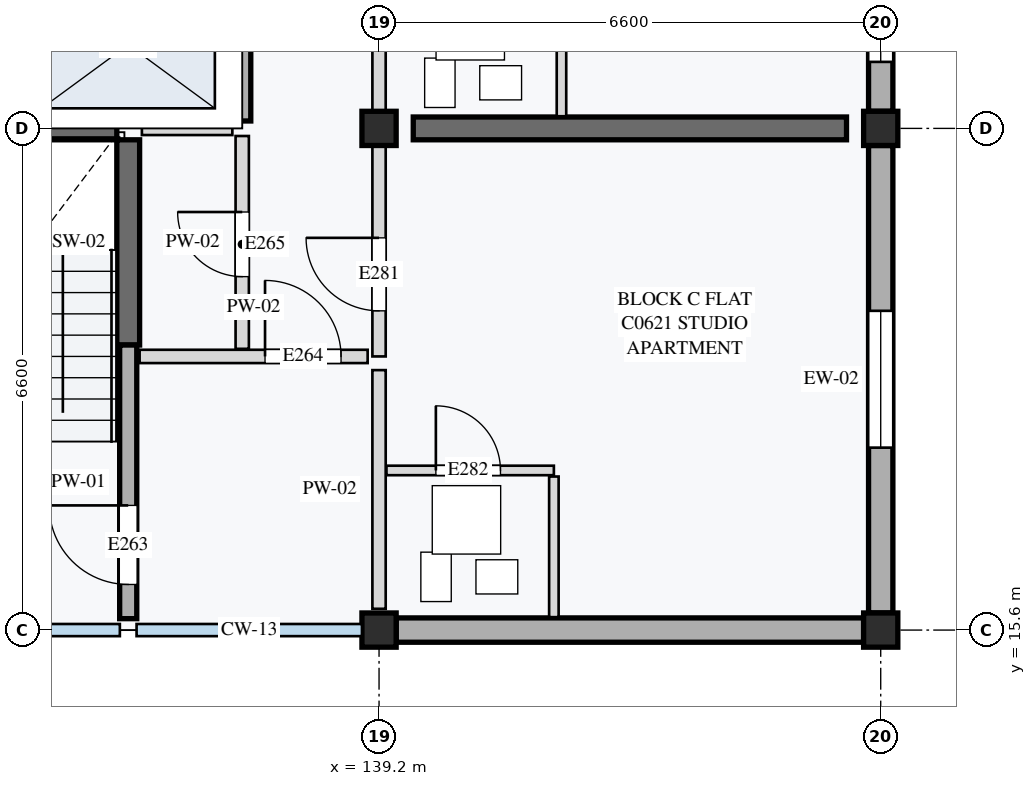
"""IFC4 building model, lengths in metres.
Left out: names, types, materials, properties, quantities, classifications, styles, units other than length and angle.
Written with IfcOpenShell. Run it as: python <this file> out.ifc"""

import sys

from ifc_helpers import new_model, si_unit, direction, frame, frame_2d, origin, origin_2d, place, context, subcontext, project, spatial, rectangle, extrude, element, fill, save


model = new_model("IFC4")
c1 = context("Model", 3, precision=1e-05, world=origin(), true_north=direction((0.0, 1.0)))
c2 = subcontext(c1, "Body", "Model", "MODEL_VIEW")
j1 = project(units=[si_unit("LENGTHUNIT", "METRE"), si_unit("PLANEANGLEUNIT", "RADIAN")], contexts=[c1])
p1 = place(None, origin())
s1 = spatial("IfcSite", under=j1, at=p1, CompositionType="ELEMENT")
p2 = place(p1, origin())
s2 = spatial("IfcBuilding", under=s1, at=p2, CompositionType="ELEMENT")
p3 = place(p2, frame((0.0, 0.0, 21.2)))
s3 = spatial("IfcBuildingStorey", under=s2, at=p3, CompositionType="ELEMENT", Elevation=21.2)
for number, where, z_axis, x_axis in (
    (1, (139.2, 15.6, 0.0), (0.0, 0.0, 1.0), (1.0, 0.0, 0.0)),
    (2, (145.8, 15.6, 0.0), (0.0, 0.0, 1.0), (1.0, 0.0, 0.0)),
    (3, (139.2, 22.2, 0.0), (0.0, 0.0, 1.0), (1.0, 0.0, 0.0)),
    (4, (145.8, 22.2, 0.0), (0.0, 0.0, 1.0), (1.0, 0.0, 0.0)),
):
    element("IfcColumn", number, at=place(p3, frame(where, z_axis=z_axis, x_axis=x_axis)), inside=s3, PredefinedType="COLUMN", context=c2, shape_type="SweptSolid", body=[
        extrude(rectangle(XDim=0.45, YDim=0.45, at=origin_2d()), origin(), (0.0, 0.0, 1.0), 3.2),
    ])
p4 = place(p3, frame((135.9, 19.35, 0.0), z_axis=(0.0, 0.0, 1.0), x_axis=(0.0, 1.0, 0.0)))
e5 = element("IfcWall", 5, at=p4, inside=s3, PredefinedType="SHEAR", context=c2, shape_type="SweptSolid", body=[
    extrude(rectangle(XDim=2.7, YDim=0.3, at=frame_2d((1.35, 0.0))), origin(), (0.0, 0.0, 1.0), 2.96),
])
p5 = place(p3, frame((132.95, 22.2, 0.0), z_axis=(0.0, 0.0, 1.0), x_axis=(1.0, 0.0, 0.0)))
e6 = element("IfcWall", 6, at=p5, inside=s3, PredefinedType="SHEAR", context=c2, shape_type="SweptSolid", body=[
    extrude(rectangle(XDim=2.8, YDim=0.3, at=frame_2d((1.4, 0.0))), origin(), (0.0, 0.0, 1.0), 2.96),
])
p6 = place(p3, frame((139.65, 22.2, 0.0), z_axis=(0.0, 0.0, 1.0), x_axis=(1.0, 0.0, 0.0)))
e7 = element("IfcWall", 7, at=p6, inside=s3, PredefinedType="SHEAR", context=c2, shape_type="SweptSolid", body=[
    extrude(rectangle(XDim=5.7, YDim=0.3, at=frame_2d((2.85, 0.0))), origin(), (0.0, 0.0, 1.0), 2.96),
])
p7 = place(p3, frame((145.8, 15.825, 0.0), z_axis=(0.0, 0.0, 1.0), x_axis=(0.0, 1.0, 0.0)))
e8 = element("IfcWall", 8, at=p7, inside=s3, PredefinedType="STANDARD", context=c2, shape_type="SweptSolid", body=[
    extrude(rectangle(XDim=6.15, YDim=0.32, at=frame_2d((3.075, 0.0))), origin(), (0.0, 0.0, 1.0), 2.6),
])
p8 = place(p7, frame((2.175, 0.0, 0.85)))
e9 = element("IfcOpeningElement", 9, at=p8, cuts=e8, PredefinedType="OPENING", context=c2, shape_type="SweptSolid", body=[
    extrude(rectangle(XDim=1.8, YDim=1.35, at=frame_2d((0.9, 0.675))), frame((0.0, 0.17, 0.0), z_axis=(0.0, -1.0, 0.0), x_axis=(1.0, 0.0, 0.0)), (0.0, 0.0, 1.0), 0.34),
])
p9 = place(p3, frame((145.8, 22.425, 0.0), z_axis=(0.0, 0.0, 1.0), x_axis=(0.0, 1.0, 0.0)))
e10 = element("IfcWall", 10, at=p9, inside=s3, PredefinedType="STANDARD", context=c2, shape_type="SweptSolid", body=[
    extrude(rectangle(XDim=6.15, YDim=0.32, at=frame_2d((3.075, 0.0))), origin(), (0.0, 0.0, 1.0), 2.6),
])
p10 = place(p9, frame((0.65, 0.0, 0.85)))
e11 = element("IfcOpeningElement", 11, at=p10, cuts=e10, PredefinedType="OPENING", context=c2, shape_type="SweptSolid", body=[
    extrude(rectangle(XDim=1.8, YDim=1.35, at=frame_2d((0.9, 0.675))), frame((0.0, 0.17, 0.0), z_axis=(0.0, -1.0, 0.0), x_axis=(1.0, 0.0, 0.0)), (0.0, 0.0, 1.0), 0.34),
])
p11 = place(p9, frame((4.075, 0.0, 0.85)))
e12 = element("IfcOpeningElement", 12, at=p11, cuts=e10, PredefinedType="OPENING", context=c2, shape_type="SweptSolid", body=[
    extrude(rectangle(XDim=1.5, YDim=1.35, at=frame_2d((0.75, 0.675))), frame((0.0, 0.17, 0.0), z_axis=(0.0, -1.0, 0.0), x_axis=(1.0, 0.0, 0.0)), (0.0, 0.0, 1.0), 0.34),
])
p12 = place(p3, frame((139.425, 15.6, 0.0), z_axis=(0.0, 0.0, 1.0), x_axis=(1.0, 0.0, 0.0)))
e13 = element("IfcWall", 13, at=p12, inside=s3, PredefinedType="STANDARD", context=c2, shape_type="SweptSolid", body=[
    extrude(rectangle(XDim=6.15, YDim=0.32, at=frame_2d((3.075, 0.0))), origin(), (0.0, 0.0, 1.0), 2.65),
])
p13 = place(p3, frame((135.9, 15.75, 0.0), z_axis=(0.0, 0.0, 1.0), x_axis=(0.0, 1.0, 0.0)))
e14 = element("IfcWall", 14, at=p13, inside=s3, PredefinedType="STANDARD", context=c2, shape_type="SweptSolid", body=[
    extrude(rectangle(XDim=3.6, YDim=0.225, at=frame_2d((1.8, 0.0))), origin(), (0.0, 0.0, 1.0), 2.96),
])
p14 = place(p13, frame((0.45, 0.0, 0.0)))
e15 = element("IfcOpeningElement", 15, at=p14, cuts=e14, PredefinedType="OPENING", context=c2, shape_type="SweptSolid", body=[
    extrude(rectangle(XDim=1.04, YDim=2.12, at=frame_2d((0.52, 1.06))), frame((0.0, 0.123, 0.0), z_axis=(0.0, -1.0, 0.0), x_axis=(1.0, 0.0, 0.0)), (0.0, 0.0, 1.0), 0.245),
])
p15 = place(p3, frame((136.05, 19.2, 0.0), z_axis=(0.0, 0.0, 1.0), x_axis=(1.0, 0.0, 0.0)))
e16 = element("IfcWall", 16, at=p15, inside=s3, PredefinedType="PARTITIONING", context=c2, shape_type="SweptSolid", body=[
    extrude(rectangle(XDim=3.0, YDim=0.175, at=frame_2d((1.5, 0.0))), origin(), (0.0, 0.0, 1.0), 2.96),
])
p16 = place(p15, frame((1.65, 0.0, 0.0)))
e17 = element("IfcOpeningElement", 17, at=p16, cuts=e16, PredefinedType="OPENING", context=c2, shape_type="SweptSolid", body=[
    extrude(rectangle(XDim=1.0, YDim=2.1, at=frame_2d((0.5, 1.05))), frame((0.0, 0.097, 0.0), z_axis=(0.0, -1.0, 0.0), x_axis=(1.0, 0.0, 0.0)), (0.0, 0.0, 1.0), 0.195),
])
p17 = place(p3, frame((137.4, 19.3, 0.0), z_axis=(0.0, 0.0, 1.0), x_axis=(0.0, 1.0, 0.0)))
e18 = element("IfcWall", 18, at=p17, inside=s3, PredefinedType="PARTITIONING", context=c2, shape_type="SweptSolid", body=[
    extrude(rectangle(XDim=2.8, YDim=0.175, at=frame_2d((1.4, 0.0))), origin(), (0.0, 0.0, 1.0), 2.96),
])
p18 = place(p17, frame((0.95, 0.0, 0.0)))
e19 = element("IfcOpeningElement", 19, at=p18, cuts=e18, PredefinedType="OPENING", context=c2, shape_type="SweptSolid", body=[
    extrude(rectangle(XDim=0.85, YDim=2.0, at=frame_2d((0.425, 1.0))), frame((0.0, 0.097, 0.0), z_axis=(0.0, -1.0, 0.0), x_axis=(1.0, 0.0, 0.0)), (0.0, 0.0, 1.0), 0.195),
])
p19 = place(p3, frame((136.08, 22.2, 0.0), z_axis=(0.0, 0.0, 1.0), x_axis=(1.0, 0.0, 0.0)))
e20 = element("IfcWall", 20, at=p19, inside=s3, PredefinedType="PARTITIONING", context=c2, shape_type="SweptSolid", body=[
    extrude(rectangle(XDim=1.19, YDim=0.175, at=frame_2d((0.595, 0.0))), origin(), (0.0, 0.0, 1.0), 2.96),
])
p20 = place(p3, frame((137.4, 22.298, 0.0), z_axis=(0.0, 0.0, 1.0), x_axis=(0.0, 1.0, 0.0)))
e21 = element("IfcWall", 21, at=p20, inside=s3, PredefinedType="STANDARD", context=c2, shape_type="SweptSolid", body=[
    extrude(rectangle(XDim=4.022, YDim=0.225, at=frame_2d((2.011, 0.0))), origin(), (0.0, 0.0, 1.0), 2.96),
])
p21 = place(p3, frame((139.2, 15.88, 0.0), z_axis=(0.0, 0.0, 1.0), x_axis=(0.0, 1.0, 0.0)))
e22 = element("IfcWall", 22, at=p21, inside=s3, PredefinedType="PARTITIONING", context=c2, shape_type="SweptSolid", body=[
    extrude(rectangle(XDim=3.14, YDim=0.175, at=frame_2d((1.57, 0.0))), origin(), (0.0, 0.0, 1.0), 2.55),
])
p22 = place(p3, frame((139.2, 19.2, 0.0), z_axis=(0.0, 0.0, 1.0), x_axis=(0.0, 1.0, 0.0)))
e23 = element("IfcWall", 23, at=p22, inside=s3, PredefinedType="PARTITIONING", context=c2, shape_type="SweptSolid", body=[
    extrude(rectangle(XDim=3.0, YDim=0.175, at=frame_2d((1.5, 0.0))), origin(), (0.0, 0.0, 1.0), 2.55),
])
p23 = place(p22, frame((0.6, 0.0, 0.0)))
e24 = element("IfcOpeningElement", 24, at=p23, cuts=e23, PredefinedType="OPENING", context=c2, shape_type="SweptSolid", body=[
    extrude(rectangle(XDim=0.96, YDim=2.18, at=frame_2d((0.48, 1.09))), frame((0.0, 0.097, 0.0), z_axis=(0.0, -1.0, 0.0), x_axis=(1.0, 0.0, 0.0)), (0.0, 0.0, 1.0), 0.195),
])
p24 = place(p3, frame((139.298, 17.7, 0.0), z_axis=(0.0, 0.0, 1.0), x_axis=(1.0, 0.0, 0.0)))
e25 = element("IfcWall", 25, at=p24, inside=s3, PredefinedType="PARTITIONING", context=c2, shape_type="SweptSolid", body=[
    extrude(rectangle(XDim=2.202, YDim=0.125, at=frame_2d((1.101, 0.0))), origin(), (0.0, 0.0, 1.0), 2.96),
])
p25 = place(p24, frame((0.65, 0.0, 0.0)))
e26 = element("IfcOpeningElement", 26, at=p25, cuts=e25, PredefinedType="OPENING", context=c2, shape_type="SweptSolid", body=[
    extrude(rectangle(XDim=0.85, YDim=2.04, at=frame_2d((0.425, 1.02))), frame((0.0, 0.073, 0.0), z_axis=(0.0, -1.0, 0.0), x_axis=(1.0, 0.0, 0.0)), (0.0, 0.0, 1.0), 0.145),
])
p26 = place(p3, frame((141.5, 15.77, 0.0), z_axis=(0.0, 0.0, 1.0), x_axis=(0.0, 1.0, 0.0)))
e27 = element("IfcWall", 27, at=p26, inside=s3, PredefinedType="PARTITIONING", context=c2, shape_type="SweptSolid", body=[
    extrude(rectangle(XDim=1.85, YDim=0.125, at=frame_2d((0.925, 0.0))), origin(), (0.0, 0.0, 1.0), 2.96),
])
p27 = place(p3, frame((139.2, 22.2, 0.0), z_axis=(0.0, 0.0, 1.0), x_axis=(0.0, 1.0, 0.0)))
e28 = element("IfcWall", 28, at=p27, inside=s3, PredefinedType="PARTITIONING", context=c2, shape_type="SweptSolid", body=[
    extrude(rectangle(XDim=6.6, YDim=0.175, at=frame_2d((3.3, 0.0))), origin(), (0.0, 0.0, 1.0), 2.55),
])
p28 = place(p27, frame((3.85, 0.0, 0.0)))
e29 = element("IfcOpeningElement", 29, at=p28, cuts=e28, PredefinedType="OPENING", context=c2, shape_type="SweptSolid", body=[
    extrude(rectangle(XDim=0.95, YDim=2.16, at=frame_2d((0.475, 1.08))), frame((0.0, 0.097, 0.0), z_axis=(0.0, -1.0, 0.0), x_axis=(1.0, 0.0, 0.0)), (0.0, 0.0, 1.0), 0.195),
])
p29 = place(p3, frame((141.6, 22.36, 0.0), z_axis=(0.0, 0.0, 1.0), x_axis=(0.0, 1.0, 0.0)))
e30 = element("IfcWall", 30, at=p29, inside=s3, PredefinedType="PARTITIONING", context=c2, shape_type="SweptSolid", body=[
    extrude(rectangle(XDim=1.66, YDim=0.125, at=frame_2d((0.83, 0.0))), origin(), (0.0, 0.0, 1.0), 2.96),
])
p30 = place(p8, origin())
e31 = element("IfcWindow", 31, at=p30, inside=s3, PartitioningType="SINGLE_PANEL", PredefinedType="WINDOW", context=c2, shape_type="SweptSolid", body=[
    extrude(rectangle(XDim=1.8, YDim=1.35, at=frame_2d((0.9, 0.675))), frame((0.0, 0.03, 0.0), z_axis=(0.0, -1.0, 0.0), x_axis=(1.0, 0.0, 0.0)), (0.0, 0.0, 1.0), 0.06),
])
fill(e9, e31)
p31 = place(p10, origin())
e32 = element("IfcWindow", 32, at=p31, inside=s3, PartitioningType="SINGLE_PANEL", PredefinedType="WINDOW", context=c2, shape_type="SweptSolid", body=[
    extrude(rectangle(XDim=1.8, YDim=1.35, at=frame_2d((0.9, 0.675))), frame((0.0, 0.03, 0.0), z_axis=(0.0, -1.0, 0.0), x_axis=(1.0, 0.0, 0.0)), (0.0, 0.0, 1.0), 0.06),
])
fill(e11, e32)
p32 = place(p14, origin())
e33 = element("IfcDoor", 33, at=p32, inside=s3, OperationType="SINGLE_SWING_RIGHT", PredefinedType="DOOR", context=c2, shape_type="SweptSolid", body=[
    extrude(rectangle(XDim=1.04, YDim=2.12, at=frame_2d((0.52, 1.06))), frame((0.0, 0.025, 0.0), z_axis=(0.0, -1.0, 0.0), x_axis=(1.0, 0.0, 0.0)), (0.0, 0.0, 1.0), 0.05),
])
fill(e15, e33)
p33 = place(p16, origin())
e34 = element("IfcDoor", 34, at=p33, inside=s3, OperationType="SINGLE_SWING_LEFT", PredefinedType="DOOR", context=c2, shape_type="SweptSolid", body=[
    extrude(rectangle(XDim=1.0, YDim=2.1, at=frame_2d((0.5, 1.05))), frame((0.0, 0.025, 0.0), z_axis=(0.0, -1.0, 0.0), x_axis=(1.0, 0.0, 0.0)), (0.0, 0.0, 1.0), 0.05),
])
fill(e17, e34)
p34 = place(p18, origin())
e35 = element("IfcDoor", 35, at=p34, inside=s3, OperationType="SINGLE_SWING_RIGHT", PredefinedType="DOOR", context=c2, shape_type="SweptSolid", body=[
    extrude(rectangle(XDim=0.85, YDim=2.0, at=frame_2d((0.425, 1.0))), frame((0.0, 0.025, 0.0), z_axis=(0.0, -1.0, 0.0), x_axis=(1.0, 0.0, 0.0)), (0.0, 0.0, 1.0), 0.05),
])
fill(e19, e35)
p35 = place(p23, origin())
e36 = element("IfcDoor", 36, at=p35, inside=s3, OperationType="SINGLE_SWING_RIGHT", PredefinedType="DOOR", context=c2, shape_type="SweptSolid", body=[
    extrude(rectangle(XDim=0.96, YDim=2.18, at=frame_2d((0.48, 1.09))), frame((0.0, 0.025, 0.0), z_axis=(0.0, -1.0, 0.0), x_axis=(1.0, 0.0, 0.0)), (0.0, 0.0, 1.0), 0.05),
])
fill(e24, e36)
p36 = place(p25, origin())
e37 = element("IfcDoor", 37, at=p36, inside=s3, OperationType="SINGLE_SWING_LEFT", PredefinedType="DOOR", context=c2, shape_type="SweptSolid", body=[
    extrude(rectangle(XDim=0.85, YDim=2.04, at=frame_2d((0.425, 1.02))), frame((0.0, 0.025, 0.0), z_axis=(0.0, -1.0, 0.0), x_axis=(1.0, 0.0, 0.0)), (0.0, 0.0, 1.0), 0.05),
])
fill(e26, e37)
save(model, sys.argv[1])
